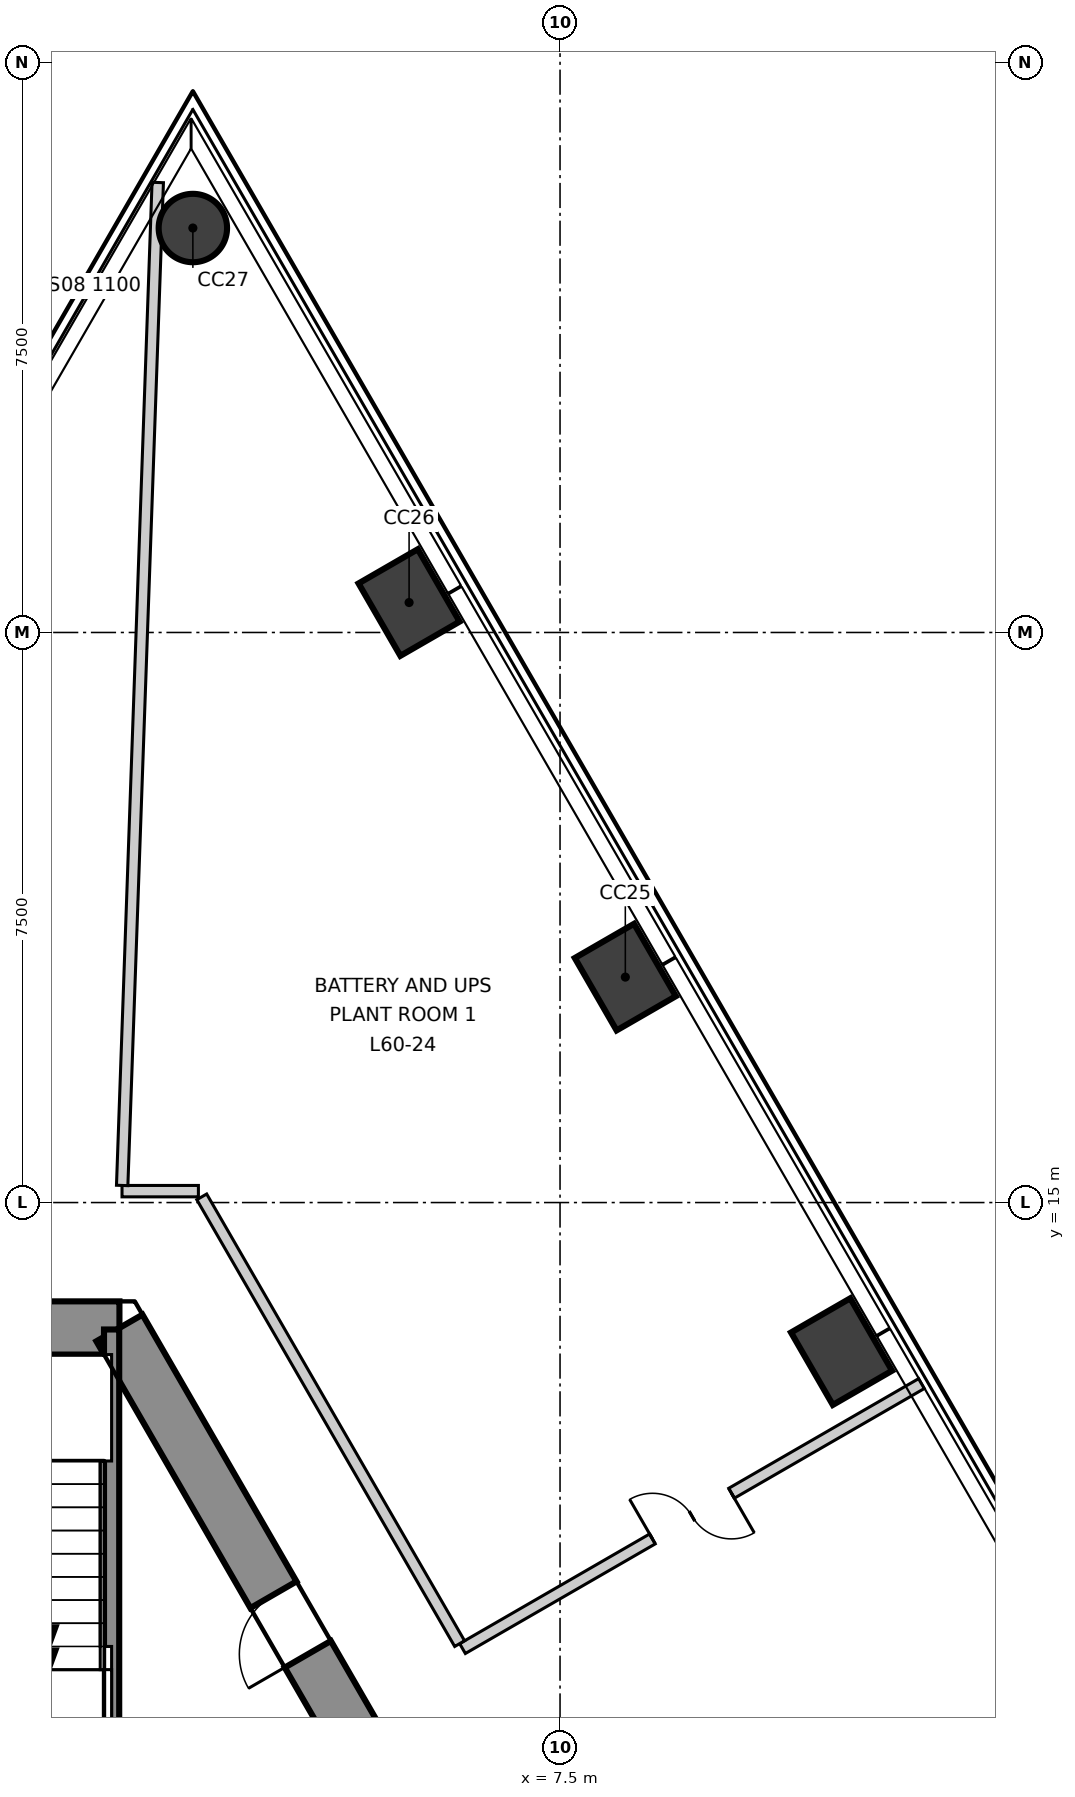
"""IFC4 building model, lengths in metres.
Left out: names, types, materials, properties, quantities, classifications, styles, units other than length and angle.
Written with IfcOpenShell. Run it as: python <this file> out.ifc"""

import sys

from ifc_helpers import new_model, si_unit, direction, frame, frame_2d, origin, origin_2d, place, context, subcontext, project, spatial, polyline, rectangle, circle, outline, extrude, element, fill, save


model = new_model("IFC4")
c1 = context("Model", 3, precision=1e-05, world=origin(), true_north=direction((0.0, 1.0)))
c2 = subcontext(c1, "Body", "Model", "MODEL_VIEW")
j1 = project(units=[si_unit("LENGTHUNIT", "METRE"), si_unit("PLANEANGLEUNIT", "RADIAN")], contexts=[c1])
p1 = place(None, origin())
s1 = spatial("IfcSite", under=j1, at=p1, CompositionType="ELEMENT")
p2 = place(p1, origin())
s2 = spatial("IfcBuilding", under=s1, at=p2, CompositionType="ELEMENT")
p3 = place(p2, frame((0.0, 0.0, 255.8)))
s3 = spatial("IfcBuildingStorey", under=s2, at=p3, CompositionType="ELEMENT", Elevation=255.8)
p4 = place(p3, frame((1.703, 13.35, -0.6), z_axis=(0.0, 0.0, 1.0), x_axis=(-1.0, 0.0, 0.0)))
e1 = element("IfcWall", 1, at=p4, inside=s3, PredefinedType="SHEAR", context=c2, shape_type="SweptSolid", body=[
    extrude(outline(polyline([(-0.202, -0.35), (1.703, -0.35), (3.608, -0.35), (3.204, 0.35), (1.703, 0.35), (0.202, 0.35), (-0.202, -0.35)])), origin(), (0.0, 0.0, 1.0), 6.3),
])
p5 = place(p4, frame((1.553, 0.0, 0.6)))
e2 = element("IfcOpeningElement", 2, at=p5, cuts=e1, PredefinedType="OPENING", context=c2, shape_type="SweptSolid", body=[
    extrude(rectangle(XDim=1.4, YDim=2.1, at=frame_2d((0.7, 1.05))), frame((0.0, 0.36, 0.0), z_axis=(0.0, -1.0, 0.0), x_axis=(1.0, 0.0, 0.0)), (0.0, 0.0, 1.0), 0.72),
])
p6 = place(p3, frame((12.413, -5.2, -0.6), z_axis=(0.0, 0.0, 1.0), x_axis=(-0.500011533395, 0.866018744874, 0.0)))
e3 = element("IfcWall", 3, at=p6, inside=s3, PredefinedType="SHEAR", context=c2, shape_type="SweptSolid", body=[
    extrude(outline(polyline([(-0.202, -0.35), (1.782, -0.35), (3.766, -0.35), (5.75, -0.35), (7.734, -0.35), (9.718, -0.35), (11.702, -0.35), (13.686, -0.35), (15.67, -0.35), (17.654, -0.35), (19.638, -0.35), (21.622, -0.35), (21.218, 0.35), (19.307, 0.35), (17.397, 0.35), (15.486, 0.35), (13.576, 0.35), (11.665, 0.35), (9.755, 0.35), (7.844, 0.35), (5.934, 0.35), (4.023, 0.35), (2.113, 0.35), (0.202, 0.35), (-0.202, -0.35)])), origin(), (0.0, 0.0, 1.0), 6.3),
])
p7 = place(p6, frame((16.465, 0.0, 0.6)))
e4 = element("IfcOpeningElement", 4, at=p7, cuts=e3, PredefinedType="OPENING", context=c2, shape_type="SweptSolid", body=[
    extrude(rectangle(XDim=0.9, YDim=2.1, at=frame_2d((0.45, 1.05))), frame((0.0, 0.36, 0.0), z_axis=(0.0, -1.0, 0.0), x_axis=(1.0, 0.0, 0.0)), (0.0, 0.0, 1.0), 0.72),
])
for number, where, z_axis, x_axis in (
    (5, (11.204, 13.039, -0.6), (0.0, 0.0, 1.0), (-0.5, 0.866, 0.0)),
    (6, (8.359, 17.966, -0.6), (0.0, 0.0, 1.0), (-0.5, 0.866, 0.0)),
    (7, (5.514, 22.894, -0.6), (0.0, 0.0, 1.0), (-0.5, 0.866, 0.0)),
):
    element("IfcColumn", number, at=place(p3, frame(where, z_axis=z_axis, x_axis=x_axis)), inside=s3, PredefinedType="COLUMN", context=c2, shape_type="SweptSolid", body=[
        extrude(rectangle(XDim=1.1, YDim=0.9, at=origin_2d()), origin(), (0.0, 0.0, 1.0), 6.3),
    ])
p8 = place(p3, frame((2.669, 27.821, -0.6), z_axis=(0.0, 0.0, 1.0), x_axis=(-0.5, 0.866025403784, 0.0)))
e8 = element("IfcColumn", 8, at=p8, inside=s3, PredefinedType="COLUMN", context=c2, shape_type="SweptSolid", body=[
    extrude(circle(Radius=0.45, at=origin_2d()), origin(), (0.0, 0.0, 1.0), 6.3),
])
p9 = place(p3, frame((1.737, 15.15, 0.0), z_axis=(0.0, 0.0, 1.0), x_axis=(1.0, 0.0, 0.0)))
e9 = element("IfcWall", 9, at=p9, inside=s3, PredefinedType="PARTITIONING", context=c2, shape_type="SweptSolid", body=[
    extrude(rectangle(XDim=1.005, YDim=0.15, at=frame_2d((0.502, 0.0))), origin(), (0.0, 0.0, 1.0), 5.7),
])
p10 = place(p3, frame((6.217, 9.132, 0.0), z_axis=(0.0, 0.0, 1.0), x_axis=(0.866032219707, 0.49998819429, 0.0)))
e10 = element("IfcWall", 10, at=p10, inside=s3, PredefinedType="PARTITIONING", context=c2, shape_type="SweptSolid", body=[
    extrude(rectangle(XDim=6.972, YDim=0.15, at=frame_2d((3.486, 0.0))), origin(), (0.0, 0.0, 1.0), 5.7),
])
p11 = place(p10, frame((2.886, 0.0, 0.0)))
e11 = element("IfcOpeningElement", 11, at=p11, cuts=e10, PredefinedType="OPENING", context=c2, shape_type="SweptSolid", body=[
    extrude(rectangle(XDim=1.2, YDim=2.1, at=frame_2d((0.6, 1.05))), frame((0.0, 0.085, 0.0), z_axis=(0.0, -1.0, 0.0), x_axis=(1.0, 0.0, 0.0)), (0.0, 0.0, 1.0), 0.17),
])
p12 = place(p3, frame((2.786, 15.075, 0.0), z_axis=(0.0, 0.0, 1.0), x_axis=(0.499938349595, -0.866060994737, 0.0)))
e12 = element("IfcWall", 12, at=p12, inside=s3, PredefinedType="PARTITIONING", context=c2, shape_type="SweptSolid", body=[
    extrude(rectangle(XDim=6.787, YDim=0.15, at=frame_2d((3.394, 0.0))), origin(), (0.0, 0.0, 1.0), 5.7),
])
p13 = place(p3, frame((1.739, 15.225, 0.0), z_axis=(0.0, 0.0, 1.0), x_axis=(0.035447493661, 0.999371540116, 0.0)))
e13 = element("IfcWall", 13, at=p13, inside=s3, PredefinedType="PARTITIONING", context=c2, shape_type="SweptSolid", body=[
    extrude(rectangle(XDim=13.203, YDim=0.15, at=frame_2d((6.602, 0.0))), origin(), (0.0, 0.0, 1.0), 5.1),
])
p14 = place(p3, frame((1.6, 6.615, 0.0), z_axis=(0.0, 0.0, 1.0), x_axis=(0.0, 1.0, 0.0)))
e14 = element("IfcWall", 14, at=p14, inside=s3, PredefinedType="SOLIDWALL", context=c2, shape_type="SweptSolid", body=[
    extrude(rectangle(XDim=6.715, YDim=0.2, at=frame_2d((3.357, 0.0))), origin(), (0.0, 0.0, 1.0), 5.7),
])
p15 = place(p11, origin())
e15 = element("IfcDoor", 15, at=p15, inside=s3, OperationType="DOUBLE_DOOR_SINGLE_SWING", PredefinedType="DOOR", context=c2, shape_type="SweptSolid", body=[
    extrude(rectangle(XDim=1.2, YDim=2.1, at=frame_2d((0.6, 1.05))), frame((0.0, 0.025, 0.0), z_axis=(0.0, -1.0, 0.0), x_axis=(1.0, 0.0, 0.0)), (0.0, 0.0, 1.0), 0.05),
])
fill(e11, e15)
p16 = place(p7, origin())
e16 = element("IfcDoor", 16, at=p16, inside=s3, OperationType="SINGLE_SWING_RIGHT", PredefinedType="DOOR", context=c2, shape_type="SweptSolid", body=[
    extrude(rectangle(XDim=0.9, YDim=2.1, at=frame_2d((0.45, 1.05))), frame((0.0, 0.025, 0.0), z_axis=(0.0, -1.0, 0.0), x_axis=(1.0, 0.0, 0.0)), (0.0, 0.0, 1.0), 0.05),
])
fill(e4, e16)
save(model, sys.argv[1])
